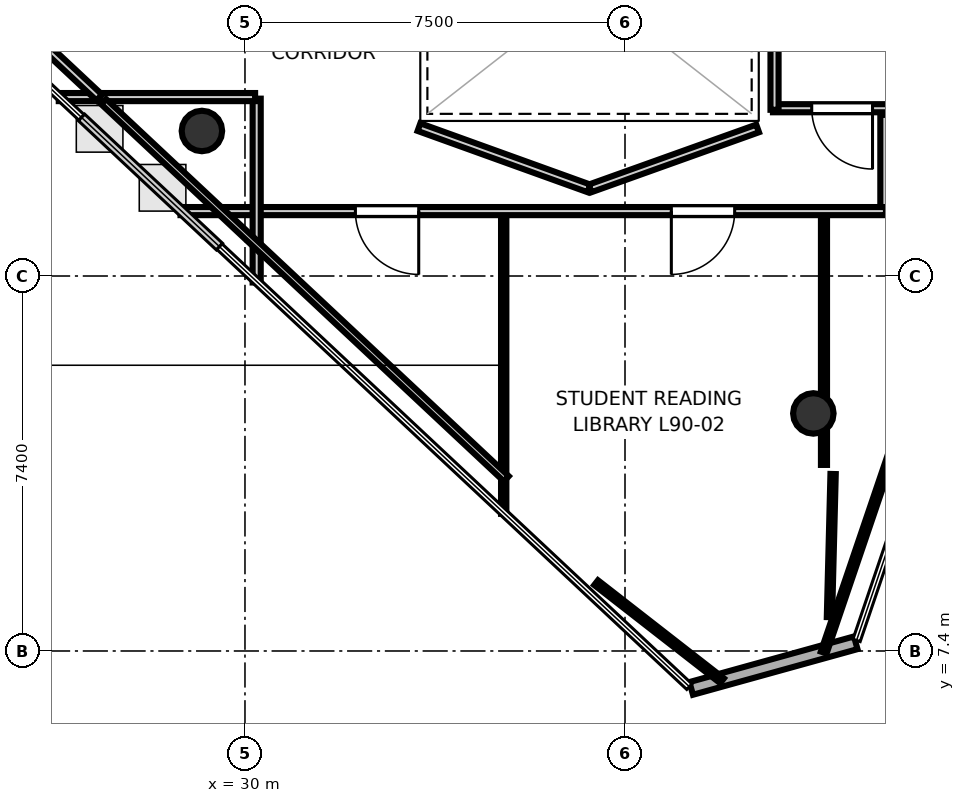
"""IFC4 building model, lengths in metres.
Left out: names, types, materials, properties, quantities, classifications, styles, units other than length and angle.
Written with IfcOpenShell. Run it as: python <this file> out.ifc"""

import sys

from ifc_helpers import new_model, si_unit, direction, frame, frame_2d, origin, origin_2d, place, context, subcontext, project, spatial, rectangle, hollow_circle, extrude, element, fill, save


model = new_model("IFC4")
c1 = context("Model", 3, precision=1e-05, world=origin(), true_north=direction((0.0, 1.0)))
c2 = subcontext(c1, "Body", "Model", "MODEL_VIEW")
j1 = project(units=[si_unit("LENGTHUNIT", "METRE"), si_unit("PLANEANGLEUNIT", "RADIAN")], contexts=[c1])
p1 = place(None, origin())
s1 = spatial("IfcSite", under=j1, at=p1, CompositionType="ELEMENT")
p2 = place(p1, origin())
s2 = spatial("IfcBuilding", under=s1, at=p2, CompositionType="ELEMENT")
p3 = place(p2, frame((0.0, 0.0, 348.1)))
s3 = spatial("IfcBuildingStorey", under=s2, at=p3, CompositionType="ELEMENT", Elevation=348.1)
for number, where, z_axis, x_axis in (
    (1, (29.15, 17.662, 0.0), (0.0, 0.0, 1.0), (1.0, 0.0, 0.0)),
    (2, (41.217, 12.088, 0.0), (0.0, 0.0, 1.0), (1.0, 0.0, 0.0)),
):
    element("IfcColumn", number, at=place(p3, frame(where, z_axis=z_axis, x_axis=x_axis)), inside=s3, PredefinedType="COLUMN", context=c2, shape_type="SweptSolid", body=[
        extrude(hollow_circle(Radius=0.4, WallThickness=0.022, at=origin_2d()), origin(), (0.0, 0.0, 1.0), 3.7),
    ])
p4 = place(p3, frame((38.806, 6.662, 0.0), z_axis=(0.0, 0.0, 1.0), x_axis=(0.963672384833, 0.267087129435, 0.0)))
e3 = element("IfcWall", 3, at=p4, inside=s3, PredefinedType="SOLIDWALL", context=c2, shape_type="SweptSolid", body=[
    extrude(rectangle(XDim=3.37, YDim=0.26, at=frame_2d((1.685, 0.0))), origin(), (0.0, 0.0, 1.0), 3.4),
])
p5 = place(p3, frame((43.15, 18.111, 0.0), z_axis=(0.0, 0.0, 1.0), x_axis=(-1.0, 0.0, 0.0)))
e4 = element("IfcWall", 4, at=p5, inside=s3, PredefinedType="PARTITIONING", context=c2, shape_type="SweptSolid", body=[
    extrude(rectangle(XDim=2.73, YDim=0.16, at=frame_2d((1.365, 0.0))), origin(), (0.0, 0.0, 1.0), 2.35),
])
p6 = place(p5, frame((0.765, 0.0, 0.0)))
e5 = element("IfcOpeningElement", 5, at=p6, cuts=e4, PredefinedType="OPENING", context=c2, shape_type="SweptSolid", body=[
    extrude(rectangle(XDim=1.2, YDim=2.15, at=frame_2d((0.6, 1.075))), frame((0.0, 0.09, 0.0), z_axis=(0.0, -1.0, 0.0), x_axis=(1.0, 0.0, 0.0)), (0.0, 0.0, 1.0), 0.18),
])
p7 = place(p3, frame((40.451, 18.08, 0.0), z_axis=(0.0, 0.0, 1.0), x_axis=(0.0, 1.0, 0.0)))
e6 = element("IfcWall", 6, at=p7, inside=s3, PredefinedType="PARTITIONING", context=c2, shape_type="SweptSolid", body=[
    extrude(rectangle(XDim=3.32, YDim=0.16, at=frame_2d((1.66, 0.0))), origin(), (0.0, 0.0, 1.0), 2.35),
])
p8 = place(p3, frame((33.434, 17.738, 0.0), z_axis=(0.0, 0.0, 1.0), x_axis=(0.940782662834, -0.339010296764, 0.0)))
e7 = element("IfcWall", 7, at=p8, inside=s3, PredefinedType="PARTITIONING", context=c2, shape_type="SweptSolid", body=[
    extrude(rectangle(XDim=3.567, YDim=0.16, at=frame_2d((1.783, 0.0))), origin(), (0.0, 0.0, 1.0), 2.35),
])
p9 = place(p3, frame((36.81, 16.529, 0.0), z_axis=(0.0, 0.0, 1.0), x_axis=(0.941548344365, 0.33687789364, 0.0)))
e8 = element("IfcWall", 8, at=p9, inside=s3, PredefinedType="PARTITIONING", context=c2, shape_type="SweptSolid", body=[
    extrude(rectangle(XDim=3.513, YDim=0.16, at=frame_2d((1.756, 0.0))), origin(), (0.0, 0.0, 1.0), 2.35),
])
p10 = place(p3, frame((42.619, 17.98, 0.0), z_axis=(0.0, 0.0, 1.0), x_axis=(0.0, -1.0, 0.0)))
e9 = element("IfcWall", 9, at=p10, inside=s3, PredefinedType="PARTITIONING", context=c2, shape_type="SweptSolid", body=[
    extrude(rectangle(XDim=1.93, YDim=0.16, at=frame_2d((0.965, 0.0))), origin(), (0.0, 0.0, 1.0), 2.35),
])
p11 = place(p3, frame((42.65, 16.081, 0.0), z_axis=(0.0, 0.0, 1.0), x_axis=(-1.0, 0.0, 0.0)))
e10 = element("IfcWall", 10, at=p11, inside=s3, PredefinedType="PARTITIONING", context=c2, shape_type="SweptSolid", body=[
    extrude(rectangle(XDim=13.922, YDim=0.16, at=frame_2d((6.961, 0.0))), origin(), (0.0, 0.0, 1.0), 2.35),
])
p12 = place(p11, frame((9.221, 0.0, 0.0)))
e11 = element("IfcOpeningElement", 11, at=p12, cuts=e10, PredefinedType="OPENING", context=c2, shape_type="SweptSolid", body=[
    extrude(rectangle(XDim=1.25, YDim=2.2, at=frame_2d((0.625, 1.1))), frame((0.0, 0.09, 0.0), z_axis=(0.0, -1.0, 0.0), x_axis=(1.0, 0.0, 0.0)), (0.0, 0.0, 1.0), 0.18),
])
p13 = place(p11, frame((2.986, 0.0, 0.0)))
e12 = element("IfcOpeningElement", 12, at=p13, cuts=e10, PredefinedType="OPENING", context=c2, shape_type="SweptSolid", body=[
    extrude(rectangle(XDim=1.25, YDim=2.2, at=frame_2d((0.625, 1.1))), frame((0.0, 0.09, 0.0), z_axis=(0.0, -1.0, 0.0), x_axis=(1.0, 0.0, 0.0)), (0.0, 0.0, 1.0), 0.18),
])
p14 = place(p3, frame((30.231, 14.672, 0.0), z_axis=(0.0, 0.0, 1.0), x_axis=(0.0, 1.0, 0.0)))
e13 = element("IfcWall", 13, at=p14, inside=s3, PredefinedType="PARTITIONING", context=c2, shape_type="SweptSolid", body=[
    extrude(rectangle(XDim=3.628, YDim=0.16, at=frame_2d((1.814, 0.0))), origin(), (0.0, 0.0, 1.0), 2.35),
])
p15 = place(p3, frame((30.2, 18.331, 0.0), z_axis=(0.0, 0.0, 1.0), x_axis=(-1.0, 0.0, 0.0)))
e14 = element("IfcWall", 14, at=p15, inside=s3, PredefinedType="PARTITIONING", context=c2, shape_type="SweptSolid", body=[
    extrude(rectangle(XDim=3.875, YDim=0.16, at=frame_2d((1.938, 0.0))), origin(), (0.0, 0.0, 1.0), 2.35),
])
p16 = place(p3, frame((27.124, 18.323, 0.0), z_axis=(0.0, 0.0, 1.0), x_axis=(-0.729915892472, 0.683536970409, 0.0)))
e15 = element("IfcWall", 15, at=p16, inside=s3, PredefinedType="PARTITIONING", context=c2, shape_type="SweptSolid", body=[
    extrude(rectangle(XDim=1.99, YDim=0.16, at=frame_2d((0.995, 0.0))), origin(), (0.0, 0.0, 1.0), 2.35),
])
p17 = place(p3, frame((35.106, 15.971, 0.0), z_axis=(0.0, 0.0, 1.0), x_axis=(0.0, -1.0, 0.0)))
e16 = element("IfcWall", 16, at=p17, inside=s3, PredefinedType="PARTITIONING", context=c2, shape_type="SweptSolid", body=[
    extrude(rectangle(XDim=5.864, YDim=0.105, at=frame_2d((2.932, 0.0))), origin(), (0.0, 0.0, 1.0), 2.35),
])
p18 = place(p3, frame((35.158, 10.799, 0.0), z_axis=(0.0, 0.0, 1.0), x_axis=(-0.729917398428, 0.683535362269, 0.0)))
e17 = element("IfcWall", 17, at=p18, inside=s3, PredefinedType="PARTITIONING", context=c2, shape_type="SweptSolid", body=[
    extrude(rectangle(XDim=10.891, YDim=0.14, at=frame_2d((5.445, 0.0))), origin(), (0.0, 0.0, 1.0), 2.35),
])
p19 = place(p3, frame((41.427, 15.97, 0.0), z_axis=(0.0, 0.0, 1.0), x_axis=(0.0, -1.0, 0.0)))
e18 = element("IfcWall", 18, at=p19, inside=s3, PredefinedType="PARTITIONING", context=c2, shape_type="SweptSolid", body=[
    extrude(rectangle(XDim=4.898, YDim=0.12, at=frame_2d((2.449, 0.0))), origin(), (0.0, 0.0, 1.0), 2.35),
])
p20 = place(p3, frame((41.607, 10.893, 0.0), z_axis=(0.0, 0.0, 1.0), x_axis=(-0.025484288863, -0.99967522277, 0.0)))
e19 = element("IfcWall", 19, at=p20, inside=s3, PredefinedType="PARTITIONING", context=c2, shape_type="SweptSolid", body=[
    extrude(rectangle(XDim=2.826, YDim=0.105, at=frame_2d((1.413, 0.0))), origin(), (0.0, 0.0, 1.0), 2.35),
])
p21 = place(p3, frame((39.415, 6.812, 0.0), z_axis=(0.0, 0.0, 1.0), x_axis=(-0.788976443226, 0.614423446847, 0.0)))
e20 = element("IfcWall", 20, at=p21, inside=s3, PredefinedType="PARTITIONING", context=c2, shape_type="SweptSolid", body=[
    extrude(rectangle(XDim=3.15, YDim=0.12, at=frame_2d((1.575, 0.0))), origin(), (0.0, 0.0, 1.0), 2.35),
])
p22 = place(p3, frame((52.912, 41.152, 0.0), z_axis=(0.0, 0.0, 1.0), x_axis=(-0.322022446104, -0.946732034002, 0.0)))
e21 = element("IfcWall", 21, at=p22, inside=s3, PredefinedType="PARTITIONING", context=c2, shape_type="SweptSolid", body=[
    extrude(rectangle(XDim=35.683, YDim=0.12, at=frame_2d((17.842, 0.0))), origin(), (0.0, 0.0, 1.0), 2.178),
])
p23 = place(p6, origin())
e22 = element("IfcDoor", 22, at=p23, inside=s3, OperationType="SINGLE_SWING_LEFT", PredefinedType="DOOR", context=c2, shape_type="SweptSolid", body=[
    extrude(rectangle(XDim=1.2, YDim=2.15, at=frame_2d((0.6, 1.075))), frame((0.0, 0.025, 0.0), z_axis=(0.0, -1.0, 0.0), x_axis=(1.0, 0.0, 0.0)), (0.0, 0.0, 1.0), 0.05),
])
fill(e5, e22)
p24 = place(p12, origin())
e23 = element("IfcDoor", 23, at=p24, inside=s3, OperationType="SINGLE_SWING_LEFT", PredefinedType="DOOR", context=c2, shape_type="SweptSolid", body=[
    extrude(rectangle(XDim=1.25, YDim=2.2, at=frame_2d((0.625, 1.1))), frame((0.0, 0.025, 0.0), z_axis=(0.0, -1.0, 0.0), x_axis=(1.0, 0.0, 0.0)), (0.0, 0.0, 1.0), 0.05),
])
fill(e11, e23)
p25 = place(p13, origin())
e24 = element("IfcDoor", 24, at=p25, inside=s3, OperationType="SINGLE_SWING_RIGHT", PredefinedType="DOOR", context=c2, shape_type="SweptSolid", body=[
    extrude(rectangle(XDim=1.25, YDim=2.2, at=frame_2d((0.625, 1.1))), frame((0.0, 0.025, 0.0), z_axis=(0.0, -1.0, 0.0), x_axis=(1.0, 0.0, 0.0)), (0.0, 0.0, 1.0), 0.05),
])
fill(e12, e24)
save(model, sys.argv[1])
